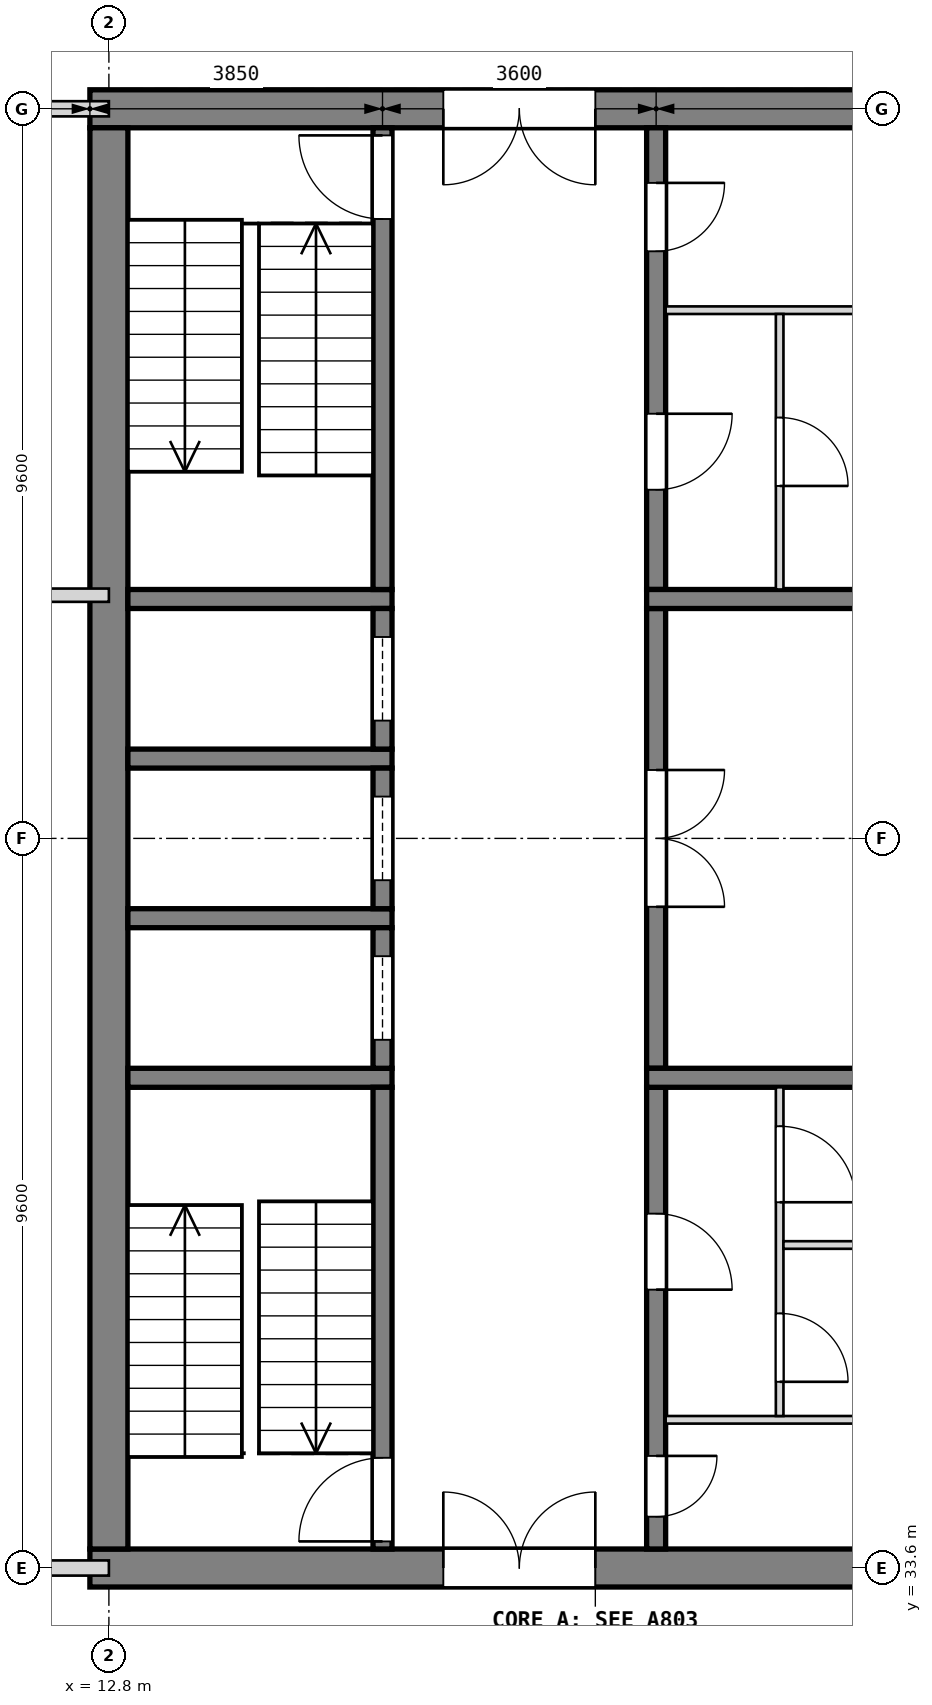
"""IFC4 building model, lengths in metres.
Left out: names, types, materials, properties, quantities, classifications, styles, units other than length and angle.
Written with IfcOpenShell. Run it as: python <this file> out.ifc"""

import sys

from ifc_helpers import new_model, si_unit, direction, frame, frame_2d, origin, place, context, subcontext, project, spatial, rectangle, extrude, element, fill, save


model = new_model("IFC4")
c1 = context("Model", 3, precision=1e-05, world=origin(), true_north=direction((0.0, 1.0)))
c2 = subcontext(c1, "Body", "Model", "MODEL_VIEW")
j1 = project(units=[si_unit("LENGTHUNIT", "METRE"), si_unit("PLANEANGLEUNIT", "RADIAN")], contexts=[c1])
p1 = place(None, origin())
s1 = spatial("IfcSite", under=j1, at=p1, CompositionType="ELEMENT")
p2 = place(p1, origin())
s2 = spatial("IfcBuilding", under=s1, at=p2, CompositionType="ELEMENT")
p3 = place(p2, frame((0.0, 0.0, 4.2)))
s3 = spatial("IfcBuildingStorey", under=s2, at=p3, CompositionType="ELEMENT", Elevation=4.2)
p4 = place(p3, frame((12.55, 52.8, 0.0), z_axis=(0.0, 0.0, 1.0), x_axis=(1.0, 0.0, 0.0)))
e1 = element("IfcWall", 1, at=p4, inside=s3, PredefinedType="SHEAR", context=c2, shape_type="SweptSolid", body=[
    extrude(rectangle(XDim=13.3, YDim=0.5, at=frame_2d((6.65, 0.0))), origin(), (0.0, 0.0, 1.0), 4.2),
])
p5 = place(p4, frame((4.65, 0.0, 0.0)))
e2 = element("IfcOpeningElement", 2, at=p5, cuts=e1, PredefinedType="OPENING", context=c2, shape_type="SweptSolid", body=[
    extrude(rectangle(XDim=2.0, YDim=2.1, at=frame_2d((1.0, 1.05))), frame((0.0, 0.26, 0.0), z_axis=(0.0, -1.0, 0.0), x_axis=(1.0, 0.0, 0.0)), (0.0, 0.0, 1.0), 0.52),
])
p6 = place(p3, frame((12.55, 33.6, 0.0), z_axis=(0.0, 0.0, 1.0), x_axis=(1.0, 0.0, 0.0)))
e3 = element("IfcWall", 3, at=p6, inside=s3, PredefinedType="SHEAR", context=c2, shape_type="SweptSolid", body=[
    extrude(rectangle(XDim=13.3, YDim=0.5, at=frame_2d((6.65, 0.0))), origin(), (0.0, 0.0, 1.0), 4.2),
])
p7 = place(p6, frame((4.65, 0.0, 0.0)))
e4 = element("IfcOpeningElement", 4, at=p7, cuts=e3, PredefinedType="OPENING", context=c2, shape_type="SweptSolid", body=[
    extrude(rectangle(XDim=2.0, YDim=2.1, at=frame_2d((1.0, 1.05))), frame((0.0, 0.26, 0.0), z_axis=(0.0, -1.0, 0.0), x_axis=(1.0, 0.0, 0.0)), (0.0, 0.0, 1.0), 0.52),
])
p8 = place(p3, frame((12.8, 33.85, 0.0), z_axis=(0.0, 0.0, 1.0), x_axis=(0.0, 1.0, 0.0)))
e5 = element("IfcWall", 5, at=p8, inside=s3, PredefinedType="SHEAR", context=c2, shape_type="SweptSolid", body=[
    extrude(rectangle(XDim=18.7, YDim=0.5, at=frame_2d((9.35, 0.0))), origin(), (0.0, 0.0, 1.0), 4.2),
])
for number, where, z_axis, x_axis in (
    (6, (13.05, 40.05, 0.0), (0.0, 0.0, 1.0), (1.0, 0.0, 0.0)),
    (7, (13.05, 42.15, 0.0), (0.0, 0.0, 1.0), (1.0, 0.0, 0.0)),
    (8, (13.05, 44.25, 0.0), (0.0, 0.0, 1.0), (1.0, 0.0, 0.0)),
    (9, (13.05, 46.35, 0.0), (0.0, 0.0, 1.0), (1.0, 0.0, 0.0)),
):
    element("IfcWall", number, at=place(p3, frame(where, z_axis=z_axis, x_axis=x_axis)), inside=s3, PredefinedType="SOLIDWALL", context=c2, shape_type="SweptSolid", body=[
        extrude(rectangle(XDim=3.475, YDim=0.25, at=frame_2d((1.737, 0.0))), origin(), (0.0, 0.0, 1.0), 3.9),
    ])
p9 = place(p3, frame((16.4, 33.85, 0.0), z_axis=(0.0, 0.0, 1.0), x_axis=(0.0, 1.0, 0.0)))
e10 = element("IfcWall", 10, at=p9, inside=s3, PredefinedType="SOLIDWALL", context=c2, shape_type="SweptSolid", body=[
    extrude(rectangle(XDim=6.075, YDim=0.25, at=frame_2d((3.038, 0.0))), origin(), (0.0, 0.0, 1.0), 3.9),
])
p10 = place(p9, frame((0.1, 0.0, 0.0)))
e11 = element("IfcOpeningElement", 11, at=p10, cuts=e10, PredefinedType="OPENING", context=c2, shape_type="SweptSolid", body=[
    extrude(rectangle(XDim=1.1, YDim=2.1, at=frame_2d((0.55, 1.05))), frame((0.0, 0.135, 0.0), z_axis=(0.0, -1.0, 0.0), x_axis=(1.0, 0.0, 0.0)), (0.0, 0.0, 1.0), 0.27),
])
p11 = place(p3, frame((16.4, 40.175, 0.0), z_axis=(0.0, 0.0, 1.0), x_axis=(0.0, 1.0, 0.0)))
e12 = element("IfcWall", 12, at=p11, inside=s3, PredefinedType="SOLIDWALL", context=c2, shape_type="SweptSolid", body=[
    extrude(rectangle(XDim=1.85, YDim=0.25, at=frame_2d((0.925, 0.0))), origin(), (0.0, 0.0, 1.0), 3.9),
])
p12 = place(p11, frame((0.375, 0.0, 0.0)))
e13 = element("IfcOpeningElement", 13, at=p12, cuts=e12, PredefinedType="OPENING", context=c2, shape_type="SweptSolid", body=[
    extrude(rectangle(XDim=1.1, YDim=2.1, at=frame_2d((0.55, 1.05))), frame((0.0, 0.135, 0.0), z_axis=(0.0, -1.0, 0.0), x_axis=(1.0, 0.0, 0.0)), (0.0, 0.0, 1.0), 0.27),
])
p13 = place(p3, frame((16.4, 42.275, 0.0), z_axis=(0.0, 0.0, 1.0), x_axis=(0.0, 1.0, 0.0)))
e14 = element("IfcWall", 14, at=p13, inside=s3, PredefinedType="SOLIDWALL", context=c2, shape_type="SweptSolid", body=[
    extrude(rectangle(XDim=1.85, YDim=0.25, at=frame_2d((0.925, 0.0))), origin(), (0.0, 0.0, 1.0), 3.9),
])
p14 = place(p13, frame((0.375, 0.0, 0.0)))
e15 = element("IfcOpeningElement", 15, at=p14, cuts=e14, PredefinedType="OPENING", context=c2, shape_type="SweptSolid", body=[
    extrude(rectangle(XDim=1.1, YDim=2.1, at=frame_2d((0.55, 1.05))), frame((0.0, 0.135, 0.0), z_axis=(0.0, -1.0, 0.0), x_axis=(1.0, 0.0, 0.0)), (0.0, 0.0, 1.0), 0.27),
])
p15 = place(p3, frame((16.4, 44.375, 0.0), z_axis=(0.0, 0.0, 1.0), x_axis=(0.0, 1.0, 0.0)))
e16 = element("IfcWall", 16, at=p15, inside=s3, PredefinedType="SOLIDWALL", context=c2, shape_type="SweptSolid", body=[
    extrude(rectangle(XDim=1.85, YDim=0.25, at=frame_2d((0.925, 0.0))), origin(), (0.0, 0.0, 1.0), 3.9),
])
p16 = place(p15, frame((0.375, 0.0, 0.0)))
e17 = element("IfcOpeningElement", 17, at=p16, cuts=e16, PredefinedType="OPENING", context=c2, shape_type="SweptSolid", body=[
    extrude(rectangle(XDim=1.1, YDim=2.1, at=frame_2d((0.55, 1.05))), frame((0.0, 0.135, 0.0), z_axis=(0.0, -1.0, 0.0), x_axis=(1.0, 0.0, 0.0)), (0.0, 0.0, 1.0), 0.27),
])
p17 = place(p3, frame((16.4, 46.475, 0.0), z_axis=(0.0, 0.0, 1.0), x_axis=(0.0, 1.0, 0.0)))
e18 = element("IfcWall", 18, at=p17, inside=s3, PredefinedType="SOLIDWALL", context=c2, shape_type="SweptSolid", body=[
    extrude(rectangle(XDim=6.075, YDim=0.25, at=frame_2d((3.038, 0.0))), origin(), (0.0, 0.0, 1.0), 3.9),
])
p18 = place(p17, frame((4.875, 0.0, 0.0)))
e19 = element("IfcOpeningElement", 19, at=p18, cuts=e18, PredefinedType="OPENING", context=c2, shape_type="SweptSolid", body=[
    extrude(rectangle(XDim=1.1, YDim=2.1, at=frame_2d((0.55, 1.05))), frame((0.0, 0.135, 0.0), z_axis=(0.0, -1.0, 0.0), x_axis=(1.0, 0.0, 0.0)), (0.0, 0.0, 1.0), 0.27),
])
p19 = place(p3, frame((20.0, 33.85, 0.0), z_axis=(0.0, 0.0, 1.0), x_axis=(0.0, 1.0, 0.0)))
e20 = element("IfcWall", 20, at=p19, inside=s3, PredefinedType="SOLIDWALL", context=c2, shape_type="SweptSolid", body=[
    extrude(rectangle(XDim=6.075, YDim=0.25, at=frame_2d((3.038, 0.0))), origin(), (0.0, 0.0, 1.0), 3.9),
])
p20 = place(p19, frame((0.425, 0.0, 0.0)))
e21 = element("IfcOpeningElement", 21, at=p20, cuts=e20, PredefinedType="OPENING", context=c2, shape_type="SweptSolid", body=[
    extrude(rectangle(XDim=0.8, YDim=2.1, at=frame_2d((0.4, 1.05))), frame((0.0, 0.135, 0.0), z_axis=(0.0, -1.0, 0.0), x_axis=(1.0, 0.0, 0.0)), (0.0, 0.0, 1.0), 0.27),
])
p21 = place(p19, frame((3.413, 0.0, 0.0)))
e22 = element("IfcOpeningElement", 22, at=p21, cuts=e20, PredefinedType="OPENING", context=c2, shape_type="SweptSolid", body=[
    extrude(rectangle(XDim=1.0, YDim=2.1, at=frame_2d((0.5, 1.05))), frame((0.0, 0.135, 0.0), z_axis=(0.0, -1.0, 0.0), x_axis=(1.0, 0.0, 0.0)), (0.0, 0.0, 1.0), 0.27),
])
p22 = place(p3, frame((20.0, 40.175, 0.0), z_axis=(0.0, 0.0, 1.0), x_axis=(0.0, 1.0, 0.0)))
e23 = element("IfcWall", 23, at=p22, inside=s3, PredefinedType="SOLIDWALL", context=c2, shape_type="SweptSolid", body=[
    extrude(rectangle(XDim=6.05, YDim=0.25, at=frame_2d((3.025, 0.0))), origin(), (0.0, 0.0, 1.0), 3.9),
])
p23 = place(p22, frame((2.125, 0.0, 0.0)))
e24 = element("IfcOpeningElement", 24, at=p23, cuts=e23, PredefinedType="OPENING", context=c2, shape_type="SweptSolid", body=[
    extrude(rectangle(XDim=1.8, YDim=2.1, at=frame_2d((0.9, 1.05))), frame((0.0, 0.135, 0.0), z_axis=(0.0, -1.0, 0.0), x_axis=(1.0, 0.0, 0.0)), (0.0, 0.0, 1.0), 0.27),
])
p24 = place(p3, frame((20.0, 46.475, 0.0), z_axis=(0.0, 0.0, 1.0), x_axis=(0.0, 1.0, 0.0)))
e25 = element("IfcWall", 25, at=p24, inside=s3, PredefinedType="SOLIDWALL", context=c2, shape_type="SweptSolid", body=[
    extrude(rectangle(XDim=6.075, YDim=0.25, at=frame_2d((3.038, 0.0))), origin(), (0.0, 0.0, 1.0), 3.9),
])
p25 = place(p24, frame((1.312, 0.0, 0.0)))
e26 = element("IfcOpeningElement", 26, at=p25, cuts=e25, PredefinedType="OPENING", context=c2, shape_type="SweptSolid", body=[
    extrude(rectangle(XDim=1.0, YDim=2.1, at=frame_2d((0.5, 1.05))), frame((0.0, 0.135, 0.0), z_axis=(0.0, -1.0, 0.0), x_axis=(1.0, 0.0, 0.0)), (0.0, 0.0, 1.0), 0.27),
])
p26 = place(p24, frame((4.45, 0.0, 0.0)))
e27 = element("IfcOpeningElement", 27, at=p26, cuts=e25, PredefinedType="OPENING", context=c2, shape_type="SweptSolid", body=[
    extrude(rectangle(XDim=0.9, YDim=2.1, at=frame_2d((0.45, 1.05))), frame((0.0, 0.135, 0.0), z_axis=(0.0, -1.0, 0.0), x_axis=(1.0, 0.0, 0.0)), (0.0, 0.0, 1.0), 0.27),
])
for number, where, z_axis, x_axis in (
    (28, (19.875, 40.05, 0.0), (0.0, 0.0, 1.0), (1.0, 0.0, 0.0)),
    (29, (19.875, 46.35, 0.0), (0.0, 0.0, 1.0), (1.0, 0.0, 0.0)),
):
    element("IfcWall", number, at=place(p3, frame(where, z_axis=z_axis, x_axis=x_axis)), inside=s3, PredefinedType="SOLIDWALL", context=c2, shape_type="SweptSolid", body=[
        extrude(rectangle(XDim=5.425, YDim=0.25, at=frame_2d((2.712, 0.0))), origin(), (0.0, 0.0, 1.0), 3.9),
    ])
p27 = place(p3, frame((20.125, 35.55, 0.0), z_axis=(0.0, 0.0, 1.0), x_axis=(1.0, 0.0, 0.0)))
e30 = element("IfcWall", 30, at=p27, inside=s3, PredefinedType="PARTITIONING", context=c2, shape_type="SweptSolid", body=[
    extrude(rectangle(XDim=5.175, YDim=0.1, at=frame_2d((2.587, 0.0))), origin(), (0.0, 0.0, 1.0), 3.9),
])
p28 = place(p3, frame((21.625, 35.6, 0.0), z_axis=(0.0, 0.0, 1.0), x_axis=(0.0, 1.0, 0.0)))
e31 = element("IfcWall", 31, at=p28, inside=s3, PredefinedType="PARTITIONING", context=c2, shape_type="SweptSolid", body=[
    extrude(rectangle(XDim=4.325, YDim=0.1, at=frame_2d((2.163, 0.0))), origin(), (0.0, 0.0, 1.0), 3.9),
])
p29 = place(p28, frame((0.45, 0.0, 0.0)))
e32 = element("IfcOpeningElement", 32, at=p29, cuts=e31, PredefinedType="OPENING", context=c2, shape_type="SweptSolid", body=[
    extrude(rectangle(XDim=0.9, YDim=2.1, at=frame_2d((0.45, 1.05))), frame((0.0, 0.06, 0.0), z_axis=(0.0, -1.0, 0.0), x_axis=(1.0, 0.0, 0.0)), (0.0, 0.0, 1.0), 0.12),
])
p30 = place(p28, frame((2.812, 0.0, 0.0)))
e33 = element("IfcOpeningElement", 33, at=p30, cuts=e31, PredefinedType="OPENING", context=c2, shape_type="SweptSolid", body=[
    extrude(rectangle(XDim=1.0, YDim=2.1, at=frame_2d((0.5, 1.05))), frame((0.0, 0.06, 0.0), z_axis=(0.0, -1.0, 0.0), x_axis=(1.0, 0.0, 0.0)), (0.0, 0.0, 1.0), 0.12),
])
p31 = place(p3, frame((21.675, 37.85, 0.0), z_axis=(0.0, 0.0, 1.0), x_axis=(1.0, 0.0, 0.0)))
e34 = element("IfcWall", 34, at=p31, inside=s3, PredefinedType="PARTITIONING", context=c2, shape_type="SweptSolid", body=[
    extrude(rectangle(XDim=3.625, YDim=0.1, at=frame_2d((1.812, 0.0))), origin(), (0.0, 0.0, 1.0), 3.9),
])
p32 = place(p3, frame((20.125, 50.15, 0.0), z_axis=(0.0, 0.0, 1.0), x_axis=(1.0, 0.0, 0.0)))
e35 = element("IfcWall", 35, at=p32, inside=s3, PredefinedType="PARTITIONING", context=c2, shape_type="SweptSolid", body=[
    extrude(rectangle(XDim=5.175, YDim=0.1, at=frame_2d((2.587, 0.0))), origin(), (0.0, 0.0, 1.0), 3.9),
])
p33 = place(p3, frame((21.625, 46.475, 0.0), z_axis=(0.0, 0.0, 1.0), x_axis=(0.0, 1.0, 0.0)))
e36 = element("IfcWall", 36, at=p33, inside=s3, PredefinedType="PARTITIONING", context=c2, shape_type="SweptSolid", body=[
    extrude(rectangle(XDim=3.625, YDim=0.1, at=frame_2d((1.812, 0.0))), origin(), (0.0, 0.0, 1.0), 3.9),
])
p34 = place(p33, frame((1.363, 0.0, 0.0)))
e37 = element("IfcOpeningElement", 37, at=p34, cuts=e36, PredefinedType="OPENING", context=c2, shape_type="SweptSolid", body=[
    extrude(rectangle(XDim=0.9, YDim=2.1, at=frame_2d((0.45, 1.05))), frame((0.0, 0.06, 0.0), z_axis=(0.0, -1.0, 0.0), x_axis=(1.0, 0.0, 0.0)), (0.0, 0.0, 1.0), 0.12),
])
p35 = place(p3, frame((8.0, 33.6, 0.0), z_axis=(0.0, 0.0, 1.0), x_axis=(1.0, 0.0, 0.0)))
e38 = element("IfcWall", 38, at=p35, inside=s3, PredefinedType="PARTITIONING", context=c2, shape_type="SweptSolid", body=[
    extrude(rectangle(XDim=4.8, YDim=0.2, at=frame_2d((2.4, 0.0))), origin(), (0.0, 0.0, 1.0), 3.9),
])
p36 = place(p35, frame((1.9, 0.0, 0.0)))
e39 = element("IfcOpeningElement", 39, at=p36, cuts=e38, PredefinedType="OPENING", context=c2, shape_type="SweptSolid", body=[
    extrude(rectangle(XDim=1.0, YDim=2.1, at=frame_2d((0.5, 1.05))), frame((0.0, 0.11, 0.0), z_axis=(0.0, -1.0, 0.0), x_axis=(1.0, 0.0, 0.0)), (0.0, 0.0, 1.0), 0.22),
])
p37 = place(p3, frame((8.0, 46.4, 0.0), z_axis=(0.0, 0.0, 1.0), x_axis=(1.0, 0.0, 0.0)))
e40 = element("IfcWall", 40, at=p37, inside=s3, PredefinedType="PARTITIONING", context=c2, shape_type="SweptSolid", body=[
    extrude(rectangle(XDim=4.8, YDim=0.175, at=frame_2d((2.4, 0.0))), origin(), (0.0, 0.0, 1.0), 3.9),
])
p38 = place(p3, frame((4.725, 52.8, 0.0), z_axis=(0.0, 0.0, 1.0), x_axis=(1.0, 0.0, 0.0)))
e41 = element("IfcWall", 41, at=p38, inside=s3, PredefinedType="PARTITIONING", context=c2, shape_type="SweptSolid", body=[
    extrude(rectangle(XDim=8.075, YDim=0.2, at=frame_2d((4.038, 0.0))), origin(), (0.0, 0.0, 1.0), 3.9),
])
p39 = place(p38, frame((3.475, 0.0, 0.0)))
e42 = element("IfcOpeningElement", 42, at=p39, cuts=e41, PredefinedType="OPENING", context=c2, shape_type="SweptSolid", body=[
    extrude(rectangle(XDim=1.0, YDim=2.1, at=frame_2d((0.5, 1.05))), frame((0.0, 0.11, 0.0), z_axis=(0.0, -1.0, 0.0), x_axis=(1.0, 0.0, 0.0)), (0.0, 0.0, 1.0), 0.22),
])
p40 = place(p10, origin())
e43 = element("IfcDoor", 43, at=p40, inside=s3, OperationType="SINGLE_SWING_LEFT", PredefinedType="DOOR", context=c2, shape_type="SweptSolid", body=[
    extrude(rectangle(XDim=1.1, YDim=2.1, at=frame_2d((0.55, 1.05))), frame((0.0, 0.025, 0.0), z_axis=(0.0, -1.0, 0.0), x_axis=(1.0, 0.0, 0.0)), (0.0, 0.0, 1.0), 0.05),
])
fill(e11, e43)
p41 = place(p18, origin())
e44 = element("IfcDoor", 44, at=p41, inside=s3, OperationType="SINGLE_SWING_RIGHT", PredefinedType="DOOR", context=c2, shape_type="SweptSolid", body=[
    extrude(rectangle(XDim=1.1, YDim=2.1, at=frame_2d((0.55, 1.05))), frame((0.0, 0.025, 0.0), z_axis=(0.0, -1.0, 0.0), x_axis=(1.0, 0.0, 0.0)), (0.0, 0.0, 1.0), 0.05),
])
fill(e19, e44)
p42 = place(p12, origin())
e45 = element("IfcDoor", 45, at=p42, inside=s3, OperationType="SLIDING_TO_LEFT", PredefinedType="DOOR", context=c2, shape_type="SweptSolid", body=[
    extrude(rectangle(XDim=1.1, YDim=2.1, at=frame_2d((0.55, 1.05))), frame((0.0, 0.025, 0.0), z_axis=(0.0, -1.0, 0.0), x_axis=(1.0, 0.0, 0.0)), (0.0, 0.0, 1.0), 0.05),
])
fill(e13, e45)
p43 = place(p14, origin())
e46 = element("IfcDoor", 46, at=p43, inside=s3, OperationType="SLIDING_TO_LEFT", PredefinedType="DOOR", context=c2, shape_type="SweptSolid", body=[
    extrude(rectangle(XDim=1.1, YDim=2.1, at=frame_2d((0.55, 1.05))), frame((0.0, 0.025, 0.0), z_axis=(0.0, -1.0, 0.0), x_axis=(1.0, 0.0, 0.0)), (0.0, 0.0, 1.0), 0.05),
])
fill(e15, e46)
p44 = place(p16, origin())
e47 = element("IfcDoor", 47, at=p44, inside=s3, OperationType="SLIDING_TO_LEFT", PredefinedType="DOOR", context=c2, shape_type="SweptSolid", body=[
    extrude(rectangle(XDim=1.1, YDim=2.1, at=frame_2d((0.55, 1.05))), frame((0.0, 0.025, 0.0), z_axis=(0.0, -1.0, 0.0), x_axis=(1.0, 0.0, 0.0)), (0.0, 0.0, 1.0), 0.05),
])
fill(e17, e47)
p45 = place(p23, frame((1.8, 0.0, 0.0), z_axis=(0.0, 0.0, 1.0), x_axis=(-1.0, 0.0, 0.0)))
e48 = element("IfcDoor", 48, at=p45, inside=s3, OperationType="DOUBLE_DOOR_SINGLE_SWING", PredefinedType="DOOR", context=c2, shape_type="SweptSolid", body=[
    extrude(rectangle(XDim=1.8, YDim=2.1, at=frame_2d((0.9, 1.05))), frame((0.0, 0.025, 0.0), z_axis=(0.0, -1.0, 0.0), x_axis=(1.0, 0.0, 0.0)), (0.0, 0.0, 1.0), 0.05),
])
fill(e24, e48)
p46 = place(p20, frame((0.8, 0.0, 0.0), z_axis=(0.0, 0.0, 1.0), x_axis=(-1.0, 0.0, 0.0)))
e49 = element("IfcDoor", 49, at=p46, inside=s3, OperationType="SINGLE_SWING_LEFT", PredefinedType="DOOR", context=c2, shape_type="SweptSolid", body=[
    extrude(rectangle(XDim=0.8, YDim=2.1, at=frame_2d((0.4, 1.05))), frame((0.0, 0.025, 0.0), z_axis=(0.0, -1.0, 0.0), x_axis=(1.0, 0.0, 0.0)), (0.0, 0.0, 1.0), 0.05),
])
fill(e21, e49)
p47 = place(p21, frame((1.0, 0.0, 0.0), z_axis=(0.0, 0.0, 1.0), x_axis=(-1.0, 0.0, 0.0)))
e50 = element("IfcDoor", 50, at=p47, inside=s3, OperationType="SINGLE_SWING_RIGHT", PredefinedType="DOOR", context=c2, shape_type="SweptSolid", body=[
    extrude(rectangle(XDim=1.0, YDim=2.1, at=frame_2d((0.5, 1.05))), frame((0.0, 0.025, 0.0), z_axis=(0.0, -1.0, 0.0), x_axis=(1.0, 0.0, 0.0)), (0.0, 0.0, 1.0), 0.05),
])
fill(e22, e50)
p48 = place(p29, frame((0.9, 0.0, 0.0), z_axis=(0.0, 0.0, 1.0), x_axis=(-1.0, 0.0, 0.0)))
e51 = element("IfcDoor", 51, at=p48, inside=s3, OperationType="SINGLE_SWING_RIGHT", PredefinedType="DOOR", context=c2, shape_type="SweptSolid", body=[
    extrude(rectangle(XDim=0.9, YDim=2.1, at=frame_2d((0.45, 1.05))), frame((0.0, 0.025, 0.0), z_axis=(0.0, -1.0, 0.0), x_axis=(1.0, 0.0, 0.0)), (0.0, 0.0, 1.0), 0.05),
])
fill(e32, e51)
p49 = place(p30, frame((1.0, 0.0, 0.0), z_axis=(0.0, 0.0, 1.0), x_axis=(-1.0, 0.0, 0.0)))
e52 = element("IfcDoor", 52, at=p49, inside=s3, OperationType="SINGLE_SWING_RIGHT", PredefinedType="DOOR", context=c2, shape_type="SweptSolid", body=[
    extrude(rectangle(XDim=1.0, YDim=2.1, at=frame_2d((0.5, 1.05))), frame((0.0, 0.025, 0.0), z_axis=(0.0, -1.0, 0.0), x_axis=(1.0, 0.0, 0.0)), (0.0, 0.0, 1.0), 0.05),
])
fill(e33, e52)
p50 = place(p25, frame((1.0, 0.0, 0.0), z_axis=(0.0, 0.0, 1.0), x_axis=(-1.0, 0.0, 0.0)))
e53 = element("IfcDoor", 53, at=p50, inside=s3, OperationType="SINGLE_SWING_LEFT", PredefinedType="DOOR", context=c2, shape_type="SweptSolid", body=[
    extrude(rectangle(XDim=1.0, YDim=2.1, at=frame_2d((0.5, 1.05))), frame((0.0, 0.025, 0.0), z_axis=(0.0, -1.0, 0.0), x_axis=(1.0, 0.0, 0.0)), (0.0, 0.0, 1.0), 0.05),
])
fill(e26, e53)
p51 = place(p34, frame((0.9, 0.0, 0.0), z_axis=(0.0, 0.0, 1.0), x_axis=(-1.0, 0.0, 0.0)))
e54 = element("IfcDoor", 54, at=p51, inside=s3, OperationType="SINGLE_SWING_RIGHT", PredefinedType="DOOR", context=c2, shape_type="SweptSolid", body=[
    extrude(rectangle(XDim=0.9, YDim=2.1, at=frame_2d((0.45, 1.05))), frame((0.0, 0.025, 0.0), z_axis=(0.0, -1.0, 0.0), x_axis=(1.0, 0.0, 0.0)), (0.0, 0.0, 1.0), 0.05),
])
fill(e37, e54)
p52 = place(p26, frame((0.9, 0.0, 0.0), z_axis=(0.0, 0.0, 1.0), x_axis=(-1.0, 0.0, 0.0)))
e55 = element("IfcDoor", 55, at=p52, inside=s3, OperationType="SINGLE_SWING_LEFT", PredefinedType="DOOR", context=c2, shape_type="SweptSolid", body=[
    extrude(rectangle(XDim=0.9, YDim=2.1, at=frame_2d((0.45, 1.05))), frame((0.0, 0.025, 0.0), z_axis=(0.0, -1.0, 0.0), x_axis=(1.0, 0.0, 0.0)), (0.0, 0.0, 1.0), 0.05),
])
fill(e27, e55)
p53 = place(p7, origin())
e56 = element("IfcDoor", 56, at=p53, inside=s3, OperationType="DOUBLE_DOOR_SINGLE_SWING", PredefinedType="DOOR", context=c2, shape_type="SweptSolid", body=[
    extrude(rectangle(XDim=2.0, YDim=2.1, at=frame_2d((1.0, 1.05))), frame((0.0, 0.025, 0.0), z_axis=(0.0, -1.0, 0.0), x_axis=(1.0, 0.0, 0.0)), (0.0, 0.0, 1.0), 0.05),
])
fill(e4, e56)
p54 = place(p5, frame((2.0, 0.0, 0.0), z_axis=(0.0, 0.0, 1.0), x_axis=(-1.0, 0.0, 0.0)))
e57 = element("IfcDoor", 57, at=p54, inside=s3, OperationType="DOUBLE_DOOR_SINGLE_SWING", PredefinedType="DOOR", context=c2, shape_type="SweptSolid", body=[
    extrude(rectangle(XDim=2.0, YDim=2.1, at=frame_2d((1.0, 1.05))), frame((0.0, 0.025, 0.0), z_axis=(0.0, -1.0, 0.0), x_axis=(1.0, 0.0, 0.0)), (0.0, 0.0, 1.0), 0.05),
])
fill(e2, e57)
save(model, sys.argv[1])
